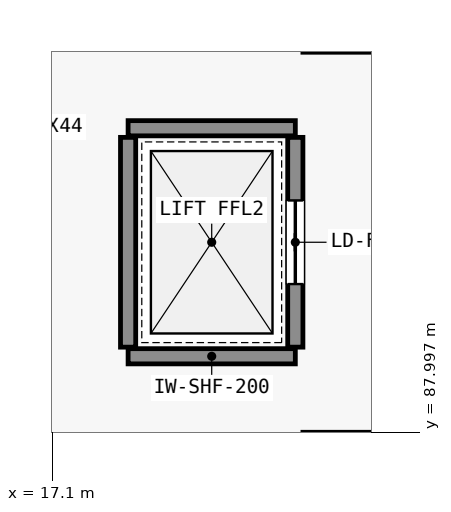
"""IFC4 building model, lengths in metres.
Left out: names, types, materials, properties, quantities, classifications, styles, units other than length and angle.
Written with IfcOpenShell. Run it as: python <this file> out.ifc"""

import sys

from ifc_helpers import new_model, si_unit, direction, frame, frame_2d, origin, place, context, subcontext, project, spatial, rectangle, extrude, element, fill, save


model = new_model("IFC4")
c1 = context("Model", 3, precision=1e-05, world=origin(), true_north=direction((0.0, 1.0)))
c2 = subcontext(c1, "Body", "Model", "MODEL_VIEW")
j1 = project(units=[si_unit("LENGTHUNIT", "METRE"), si_unit("PLANEANGLEUNIT", "RADIAN")], contexts=[c1])
p1 = place(None, origin())
s1 = spatial("IfcSite", under=j1, at=p1, CompositionType="ELEMENT")
p2 = place(p1, origin())
s2 = spatial("IfcBuilding", under=s1, at=p2, CompositionType="ELEMENT")
p3 = place(p2, frame((0.0, 0.0, 11.4)))
s3 = spatial("IfcBuildingStorey", under=s2, at=p3, CompositionType="ELEMENT", Elevation=11.4)
for number, where, z_axis, x_axis in (
    (1, (18.1, 89.0, 0.0), (0.0, 0.0, 1.0), (1.0, 0.0, 0.0)),
    (2, (18.1, 92.0, 0.0), (0.0, 0.0, 1.0), (1.0, 0.0, 0.0)),
):
    element("IfcWall", number, at=place(p3, frame(where, z_axis=z_axis, x_axis=x_axis)), inside=s3, PredefinedType="STANDARD", context=c2, shape_type="SweptSolid", body=[
        extrude(rectangle(XDim=2.2, YDim=0.2, at=frame_2d((1.1, 0.0))), origin(), (0.0, 0.0, 1.0), 4.45),
    ])
p4 = place(p3, frame((18.1, 89.12, 0.0), z_axis=(0.0, 0.0, 1.0), x_axis=(0.0, 1.0, 0.0)))
e3 = element("IfcWall", 3, at=p4, inside=s3, PredefinedType="STANDARD", context=c2, shape_type="SweptSolid", body=[
    extrude(rectangle(XDim=2.76, YDim=0.2, at=frame_2d((1.38, 0.0))), origin(), (0.0, 0.0, 1.0), 4.45),
])
p5 = place(p3, frame((20.3, 89.12, 0.0), z_axis=(0.0, 0.0, 1.0), x_axis=(0.0, 1.0, 0.0)))
e4 = element("IfcWall", 4, at=p5, inside=s3, PredefinedType="STANDARD", context=c2, shape_type="SweptSolid", body=[
    extrude(rectangle(XDim=2.76, YDim=0.2, at=frame_2d((1.38, 0.0))), origin(), (0.0, 0.0, 1.0), 4.45),
])
p6 = place(p5, frame((0.83, 0.0, 0.0)))
e5 = element("IfcOpeningElement", 5, at=p6, cuts=e4, PredefinedType="OPENING", context=c2, shape_type="SweptSolid", body=[
    extrude(rectangle(XDim=1.1, YDim=2.15, at=frame_2d((0.55, 1.075))), frame((0.0, 0.11, 0.0), z_axis=(0.0, -1.0, 0.0), x_axis=(1.0, 0.0, 0.0)), (0.0, 0.0, 1.0), 0.22),
])
p7 = place(p6, origin())
e6 = element("IfcDoor", 6, at=p7, inside=s3, OperationType="SLIDING_TO_LEFT", PredefinedType="DOOR", context=c2, shape_type="SweptSolid", body=[
    extrude(rectangle(XDim=1.1, YDim=2.15, at=frame_2d((0.55, 1.075))), frame((0.0, 0.025, 0.0), z_axis=(0.0, -1.0, 0.0), x_axis=(1.0, 0.0, 0.0)), (0.0, 0.0, 1.0), 0.05),
])
fill(e5, e6)
save(model, sys.argv[1])
